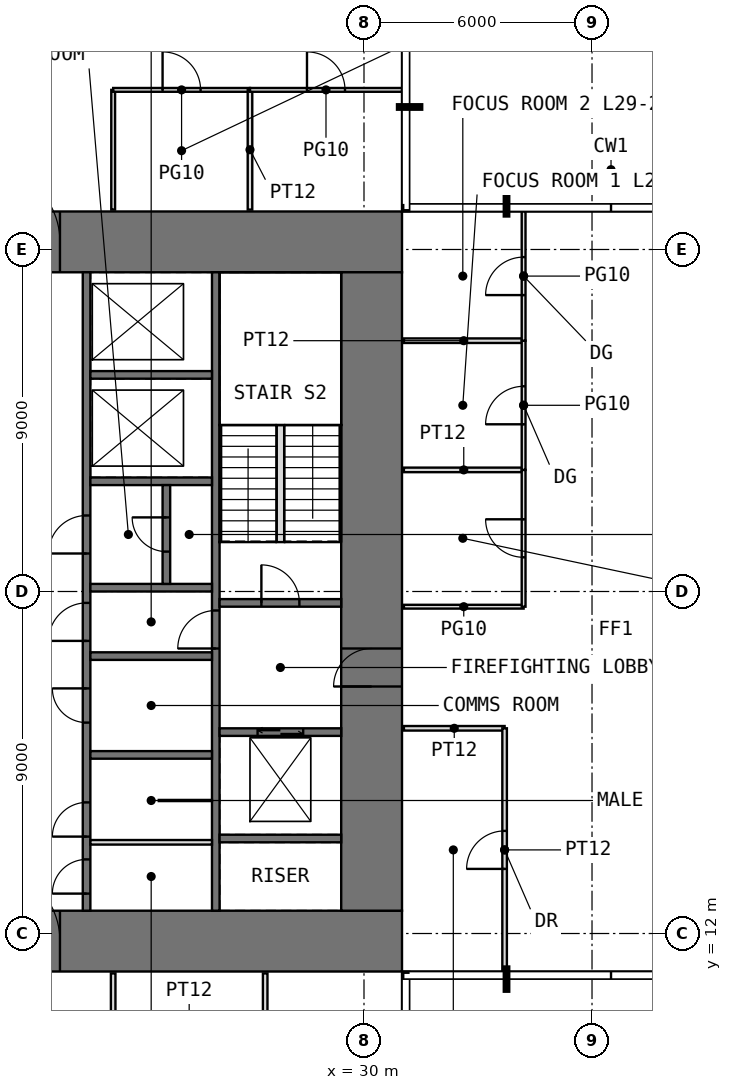
"""IFC4 building model, lengths in metres.
Left out: names, types, materials, properties, quantities, classifications, styles, units other than length and angle.
Written with IfcOpenShell. Run it as: python <this file> out.ifc"""

import sys

from ifc_helpers import new_model, si_unit, direction, frame, frame_2d, origin, place, context, subcontext, project, spatial, rectangle, extrude, element, fill, save


model = new_model("IFC4")
c1 = context("Model", 3, precision=1e-05, world=origin(), true_north=direction((0.0, 1.0)))
c2 = subcontext(c1, "Body", "Model", "MODEL_VIEW")
j1 = project(units=[si_unit("LENGTHUNIT", "METRE"), si_unit("PLANEANGLEUNIT", "RADIAN")], contexts=[c1])
p1 = place(None, origin())
s1 = spatial("IfcSite", under=j1, at=p1, CompositionType="ELEMENT")
p2 = place(p1, origin())
s2 = spatial("IfcBuilding", under=s1, at=p2, CompositionType="ELEMENT")
p3 = place(p2, frame((0.0, 0.0, 124.5)))
s3 = spatial("IfcBuildingStorey", under=s2, at=p3, CompositionType="ELEMENT", Elevation=124.5)
p4 = place(p3, frame((11.0, 11.8, -0.05), z_axis=(0.0, 0.0, 1.0), x_axis=(1.0, 0.0, 0.0)))
e1 = element("IfcWall", 1, at=p4, inside=s3, PredefinedType="SHEAR", context=c2, shape_type="SweptSolid", body=[
    extrude(rectangle(XDim=20.0, YDim=1.6, at=frame_2d((10.0, 0.0))), origin(), (0.0, 0.0, 1.0), 4.0),
])
p5 = place(p4, frame((9.0, 0.0, 0.05)))
e2 = element("IfcOpeningElement", 2, at=p5, cuts=e1, PredefinedType="OPENING", context=c2, shape_type="SweptSolid", body=[
    extrude(rectangle(XDim=2.0, YDim=2.2, at=frame_2d((1.0, 1.1))), frame((0.0, 0.81, 0.0), z_axis=(0.0, -1.0, 0.0), x_axis=(1.0, 0.0, 0.0)), (0.0, 0.0, 1.0), 1.62),
])
p6 = place(p3, frame((11.0, 30.2, -0.05), z_axis=(0.0, 0.0, 1.0), x_axis=(1.0, 0.0, 0.0)))
e3 = element("IfcWall", 3, at=p6, inside=s3, PredefinedType="SHEAR", context=c2, shape_type="SweptSolid", body=[
    extrude(rectangle(XDim=20.0, YDim=1.6, at=frame_2d((10.0, 0.0))), origin(), (0.0, 0.0, 1.0), 4.0),
])
p7 = place(p6, frame((9.0, 0.0, 0.05)))
e4 = element("IfcOpeningElement", 4, at=p7, cuts=e3, PredefinedType="OPENING", context=c2, shape_type="SweptSolid", body=[
    extrude(rectangle(XDim=2.0, YDim=2.2, at=frame_2d((1.0, 1.1))), frame((0.0, 0.81, 0.0), z_axis=(0.0, -1.0, 0.0), x_axis=(1.0, 0.0, 0.0)), (0.0, 0.0, 1.0), 1.62),
])
p8 = place(p3, frame((30.2, 12.6, -0.05), z_axis=(0.0, 0.0, 1.0), x_axis=(0.0, 1.0, 0.0)))
e5 = element("IfcWall", 5, at=p8, inside=s3, PredefinedType="SHEAR", context=c2, shape_type="SweptSolid", body=[
    extrude(rectangle(XDim=16.8, YDim=1.6, at=frame_2d((8.4, 0.0))), origin(), (0.0, 0.0, 1.0), 4.0),
])
p9 = place(p8, frame((5.9, 0.0, 0.05)))
e6 = element("IfcOpeningElement", 6, at=p9, cuts=e5, PredefinedType="OPENING", context=c2, shape_type="SweptSolid", body=[
    extrude(rectangle(XDim=1.0, YDim=2.2, at=frame_2d((0.5, 1.1))), frame((0.0, 0.81, 0.0), z_axis=(0.0, -1.0, 0.0), x_axis=(1.0, 0.0, 0.0)), (0.0, 0.0, 1.0), 1.62),
])
p10 = place(p3, frame((22.7, 12.6, -0.05), z_axis=(0.0, 0.0, 1.0), x_axis=(0.0, 1.0, 0.0)))
e7 = element("IfcWall", 7, at=p10, inside=s3, PredefinedType="SHEAR", context=c2, shape_type="SweptSolid", body=[
    extrude(rectangle(XDim=16.8, YDim=0.2, at=frame_2d((8.4, 0.0))), origin(), (0.0, 0.0, 1.0), 4.0),
])
p11 = place(p10, frame((0.45, 0.0, 0.05)))
e8 = element("IfcOpeningElement", 8, at=p11, cuts=e7, PredefinedType="OPENING", context=c2, shape_type="SweptSolid", body=[
    extrude(rectangle(XDim=0.9, YDim=2.2, at=frame_2d((0.45, 1.1))), frame((0.0, 0.11, 0.0), z_axis=(0.0, -1.0, 0.0), x_axis=(1.0, 0.0, 0.0)), (0.0, 0.0, 1.0), 0.22),
])
p12 = place(p10, frame((7.1, 0.0, 0.05)))
e9 = element("IfcOpeningElement", 9, at=p12, cuts=e7, PredefinedType="OPENING", context=c2, shape_type="SweptSolid", body=[
    extrude(rectangle(XDim=1.0, YDim=2.2, at=frame_2d((0.5, 1.1))), frame((0.0, 0.11, 0.0), z_axis=(0.0, -1.0, 0.0), x_axis=(1.0, 0.0, 0.0)), (0.0, 0.0, 1.0), 0.22),
])
p13 = place(p10, frame((1.95, 0.0, 0.05)))
e10 = element("IfcOpeningElement", 10, at=p13, cuts=e7, PredefinedType="OPENING", context=c2, shape_type="SweptSolid", body=[
    extrude(rectangle(XDim=0.9, YDim=2.2, at=frame_2d((0.45, 1.1))), frame((0.0, 0.11, 0.0), z_axis=(0.0, -1.0, 0.0), x_axis=(1.0, 0.0, 0.0)), (0.0, 0.0, 1.0), 0.22),
])
p14 = place(p10, frame((4.95, 0.0, 0.05)))
e11 = element("IfcOpeningElement", 11, at=p14, cuts=e7, PredefinedType="OPENING", context=c2, shape_type="SweptSolid", body=[
    extrude(rectangle(XDim=0.9, YDim=2.2, at=frame_2d((0.45, 1.1))), frame((0.0, 0.11, 0.0), z_axis=(0.0, -1.0, 0.0), x_axis=(1.0, 0.0, 0.0)), (0.0, 0.0, 1.0), 0.22),
])
p15 = place(p10, frame((9.4, 0.0, 0.05)))
e12 = element("IfcOpeningElement", 12, at=p15, cuts=e7, PredefinedType="OPENING", context=c2, shape_type="SweptSolid", body=[
    extrude(rectangle(XDim=1.0, YDim=2.2, at=frame_2d((0.5, 1.1))), frame((0.0, 0.11, 0.0), z_axis=(0.0, -1.0, 0.0), x_axis=(1.0, 0.0, 0.0)), (0.0, 0.0, 1.0), 0.22),
])
p16 = place(p3, frame((26.1, 12.6, -0.05), z_axis=(0.0, 0.0, 1.0), x_axis=(0.0, 1.0, 0.0)))
e13 = element("IfcWall", 13, at=p16, inside=s3, PredefinedType="SHEAR", context=c2, shape_type="SweptSolid", body=[
    extrude(rectangle(XDim=16.8, YDim=0.2, at=frame_2d((8.4, 0.0))), origin(), (0.0, 0.0, 1.0), 4.0),
])
p17 = place(p16, frame((6.9, 0.0, 0.05)))
e14 = element("IfcOpeningElement", 14, at=p17, cuts=e13, PredefinedType="OPENING", context=c2, shape_type="SweptSolid", body=[
    extrude(rectangle(XDim=1.0, YDim=2.2, at=frame_2d((0.5, 1.1))), frame((0.0, 0.11, 0.0), z_axis=(0.0, -1.0, 0.0), x_axis=(1.0, 0.0, 0.0)), (0.0, 0.0, 1.0), 0.22),
])
for number, where, z_axis, x_axis in (
    (15, (22.8, 16.7, -0.05), (0.0, 0.0, 1.0), (1.0, 0.0, 0.0)),
    (16, (22.8, 19.3, -0.05), (0.0, 0.0, 1.0), (1.0, 0.0, 0.0)),
    (17, (22.8, 21.1, -0.05), (0.0, 0.0, 1.0), (1.0, 0.0, 0.0)),
    (18, (22.8, 23.9, -0.05), (0.0, 0.0, 1.0), (1.0, 0.0, 0.0)),
    (19, (22.8, 26.7, -0.05), (0.0, 0.0, 1.0), (1.0, 0.0, 0.0)),
    (20, (26.2, 14.5, -0.05), (0.0, 0.0, 1.0), (1.0, 0.0, 0.0)),
):
    element("IfcWall", number, at=place(p3, frame(where, z_axis=z_axis, x_axis=x_axis)), inside=s3, PredefinedType="SHEAR", context=c2, shape_type="SweptSolid", body=[
        extrude(rectangle(XDim=3.2, YDim=0.2, at=frame_2d((1.6, 0.0))), origin(), (0.0, 0.0, 1.0), 4.0),
    ])
p18 = place(p3, frame((26.2, 17.3, -0.05), z_axis=(0.0, 0.0, 1.0), x_axis=(1.0, 0.0, 0.0)))
e21 = element("IfcWall", 21, at=p18, inside=s3, PredefinedType="SHEAR", context=c2, shape_type="SweptSolid", body=[
    extrude(rectangle(XDim=3.2, YDim=0.2, at=frame_2d((1.6, 0.0))), origin(), (0.0, 0.0, 1.0), 4.0),
])
p19 = place(p18, frame((1.0, 0.0, 0.05)))
e22 = element("IfcOpeningElement", 22, at=p19, cuts=e21, PredefinedType="OPENING", context=c2, shape_type="SweptSolid", body=[
    extrude(rectangle(XDim=1.2, YDim=2.2, at=frame_2d((0.6, 1.1))), frame((0.0, 0.11, 0.0), z_axis=(0.0, -1.0, 0.0), x_axis=(1.0, 0.0, 0.0)), (0.0, 0.0, 1.0), 0.22),
])
p20 = place(p3, frame((26.2, 20.7, -0.05), z_axis=(0.0, 0.0, 1.0), x_axis=(1.0, 0.0, 0.0)))
e23 = element("IfcWall", 23, at=p20, inside=s3, PredefinedType="SHEAR", context=c2, shape_type="SweptSolid", body=[
    extrude(rectangle(XDim=3.2, YDim=0.2, at=frame_2d((1.6, 0.0))), origin(), (0.0, 0.0, 1.0), 4.0),
])
p21 = place(p20, frame((1.1, 0.0, 0.05)))
e24 = element("IfcOpeningElement", 24, at=p21, cuts=e23, PredefinedType="OPENING", context=c2, shape_type="SweptSolid", body=[
    extrude(rectangle(XDim=1.0, YDim=2.2, at=frame_2d((0.5, 1.1))), frame((0.0, 0.11, 0.0), z_axis=(0.0, -1.0, 0.0), x_axis=(1.0, 0.0, 0.0)), (0.0, 0.0, 1.0), 0.22),
])
p22 = place(p3, frame((22.8, 14.4, 0.0), z_axis=(0.0, 0.0, 1.0), x_axis=(1.0, 0.0, 0.0)))
e25 = element("IfcWall", 25, at=p22, inside=s3, PredefinedType="PARTITIONING", context=c2, shape_type="SweptSolid", body=[
    extrude(rectangle(XDim=3.2, YDim=0.12, at=frame_2d((1.6, 0.0))), origin(), (0.0, 0.0, 1.0), 3.75),
])
p23 = place(p3, frame((24.6, 15.5, 0.0), z_axis=(0.0, 0.0, 1.0), x_axis=(1.0, 0.0, 0.0)))
e26 = element("IfcWall", 26, at=p23, inside=s3, PredefinedType="PARTITIONING", context=c2, shape_type="SweptSolid", body=[
    extrude(rectangle(XDim=1.4, YDim=0.03, at=frame_2d((0.7, 0.0))), origin(), (0.0, 0.0, 1.0), 3.75),
])
p24 = place(p3, frame((24.8, 21.2, -0.05), z_axis=(0.0, 0.0, 1.0), x_axis=(0.0, 1.0, 0.0)))
e27 = element("IfcWall", 27, at=p24, inside=s3, PredefinedType="SHEAR", context=c2, shape_type="SweptSolid", body=[
    extrude(rectangle(XDim=2.6, YDim=0.2, at=frame_2d((1.3, 0.0))), origin(), (0.0, 0.0, 1.0), 4.0),
])
p25 = place(p24, frame((0.85, 0.0, 0.05)))
e28 = element("IfcOpeningElement", 28, at=p25, cuts=e27, PredefinedType="OPENING", context=c2, shape_type="SweptSolid", body=[
    extrude(rectangle(XDim=0.9, YDim=2.2, at=frame_2d((0.45, 1.1))), frame((0.0, 0.11, 0.0), z_axis=(0.0, -1.0, 0.0), x_axis=(1.0, 0.0, 0.0)), (0.0, 0.0, 1.0), 0.22),
])
p26 = place(p3, frame((23.4, 8.3, 0.0), z_axis=(0.0, 0.0, 1.0), x_axis=(0.0, 1.0, 0.0)))
e29 = element("IfcWall", 29, at=p26, inside=s3, PredefinedType="PARTITIONING", context=c2, shape_type="SweptSolid", body=[
    extrude(rectangle(XDim=2.65, YDim=0.12, at=frame_2d((1.325, 0.0))), origin(), (0.0, 0.0, 1.0), 3.75),
])
p27 = place(p3, frame((23.4, 31.05, 0.0), z_axis=(0.0, 0.0, 1.0), x_axis=(0.0, 1.0, 0.0)))
e30 = element("IfcWall", 30, at=p27, inside=s3, PredefinedType="PARTITIONING", context=c2, shape_type="SweptSolid", body=[
    extrude(rectangle(XDim=3.15, YDim=0.1, at=frame_2d((1.575, 0.0))), origin(), (0.0, 0.0, 1.0), 3.75),
])
p28 = place(p3, frame((23.4, 34.2, 0.0), z_axis=(0.0, 0.0, 1.0), x_axis=(1.0, 0.0, 0.0)))
e31 = element("IfcWall", 31, at=p28, inside=s3, PredefinedType="PARTITIONING", context=c2, shape_type="SweptSolid", body=[
    extrude(rectangle(XDim=3.6, YDim=0.1, at=frame_2d((1.8, 0.0))), origin(), (0.0, 0.0, 1.0), 3.75),
])
p29 = place(p28, frame((1.3, 0.0, 0.0)))
e32 = element("IfcOpeningElement", 32, at=p29, cuts=e31, PredefinedType="OPENING", context=c2, shape_type="SweptSolid", body=[
    extrude(rectangle(XDim=1.0, YDim=2.4, at=frame_2d((0.5, 1.2))), frame((0.0, 0.06, 0.0), z_axis=(0.0, -1.0, 0.0), x_axis=(1.0, 0.0, 0.0)), (0.0, 0.0, 1.0), 0.12),
])
p30 = place(p3, frame((27.0, 31.05, 0.0), z_axis=(0.0, 0.0, 1.0), x_axis=(0.0, 1.0, 0.0)))
e33 = element("IfcWall", 33, at=p30, inside=s3, PredefinedType="PARTITIONING", context=c2, shape_type="SweptSolid", body=[
    extrude(rectangle(XDim=3.15, YDim=0.12, at=frame_2d((1.575, 0.0))), origin(), (0.0, 0.0, 1.0), 3.75),
])
p31 = place(p3, frame((27.0, 34.2, 0.0), z_axis=(0.0, 0.0, 1.0), x_axis=(1.0, 0.0, 0.0)))
e34 = element("IfcWall", 34, at=p31, inside=s3, PredefinedType="PARTITIONING", context=c2, shape_type="SweptSolid", body=[
    extrude(rectangle(XDim=4.0, YDim=0.1, at=frame_2d((2.0, 0.0))), origin(), (0.0, 0.0, 1.0), 3.75),
])
p32 = place(p31, frame((1.5, 0.0, 0.0)))
e35 = element("IfcOpeningElement", 35, at=p32, cuts=e34, PredefinedType="OPENING", context=c2, shape_type="SweptSolid", body=[
    extrude(rectangle(XDim=1.0, YDim=2.4, at=frame_2d((0.5, 1.2))), frame((0.0, 0.06, 0.0), z_axis=(0.0, -1.0, 0.0), x_axis=(1.0, 0.0, 0.0)), (0.0, 0.0, 1.0), 0.12),
])
for number, where, z_axis, x_axis in (
    (36, (27.4, 8.3, 0.0), (0.0, 0.0, 1.0), (0.0, 1.0, 0.0)),
    (37, (31.05, 17.4, 0.0), (0.0, 0.0, 1.0), (1.0, 0.0, 0.0)),
):
    element("IfcWall", number, at=place(p3, frame(where, z_axis=z_axis, x_axis=x_axis)), inside=s3, PredefinedType="PARTITIONING", context=c2, shape_type="SweptSolid", body=[
        extrude(rectangle(XDim=2.65, YDim=0.12, at=frame_2d((1.325, 0.0))), origin(), (0.0, 0.0, 1.0), 3.75),
    ])
p33 = place(p3, frame((31.05, 20.6, 0.0), z_axis=(0.0, 0.0, 1.0), x_axis=(1.0, 0.0, 0.0)))
e38 = element("IfcWall", 38, at=p33, inside=s3, PredefinedType="PARTITIONING", context=c2, shape_type="SweptSolid", body=[
    extrude(rectangle(XDim=3.15, YDim=0.1, at=frame_2d((1.575, 0.0))), origin(), (0.0, 0.0, 1.0), 3.75),
])
for number, where, z_axis, x_axis in (
    (39, (31.05, 24.2, 0.0), (0.0, 0.0, 1.0), (1.0, 0.0, 0.0)),
    (40, (31.05, 27.6, 0.0), (0.0, 0.0, 1.0), (1.0, 0.0, 0.0)),
):
    element("IfcWall", number, at=place(p3, frame(where, z_axis=z_axis, x_axis=x_axis)), inside=s3, PredefinedType="PARTITIONING", context=c2, shape_type="SweptSolid", body=[
        extrude(rectangle(XDim=3.15, YDim=0.12, at=frame_2d((1.575, 0.0))), origin(), (0.0, 0.0, 1.0), 3.75),
    ])
p34 = place(p3, frame((33.7, 11.0, 0.0), z_axis=(0.0, 0.0, 1.0), x_axis=(0.0, 1.0, 0.0)))
e41 = element("IfcWall", 41, at=p34, inside=s3, PredefinedType="PARTITIONING", context=c2, shape_type="SweptSolid", body=[
    extrude(rectangle(XDim=6.4, YDim=0.12, at=frame_2d((3.2, 0.0))), origin(), (0.0, 0.0, 1.0), 3.75),
])
p35 = place(p34, frame((2.7, 0.0, 0.0)))
e42 = element("IfcOpeningElement", 42, at=p35, cuts=e41, PredefinedType="OPENING", context=c2, shape_type="SweptSolid", body=[
    extrude(rectangle(XDim=1.0, YDim=2.2, at=frame_2d((0.5, 1.1))), frame((0.0, 0.07, 0.0), z_axis=(0.0, -1.0, 0.0), x_axis=(1.0, 0.0, 0.0)), (0.0, 0.0, 1.0), 0.14),
])
p36 = place(p3, frame((34.2, 20.6, 0.0), z_axis=(0.0, 0.0, 1.0), x_axis=(0.0, 1.0, 0.0)))
e43 = element("IfcWall", 43, at=p36, inside=s3, PredefinedType="PARTITIONING", context=c2, shape_type="SweptSolid", body=[
    extrude(rectangle(XDim=3.6, YDim=0.1, at=frame_2d((1.8, 0.0))), origin(), (0.0, 0.0, 1.0), 3.75),
])
p37 = place(p36, frame((1.3, 0.0, 0.0)))
e44 = element("IfcOpeningElement", 44, at=p37, cuts=e43, PredefinedType="OPENING", context=c2, shape_type="SweptSolid", body=[
    extrude(rectangle(XDim=1.0, YDim=2.4, at=frame_2d((0.5, 1.2))), frame((0.0, 0.06, 0.0), z_axis=(0.0, -1.0, 0.0), x_axis=(1.0, 0.0, 0.0)), (0.0, 0.0, 1.0), 0.12),
])
p38 = place(p3, frame((34.2, 24.2, 0.0), z_axis=(0.0, 0.0, 1.0), x_axis=(0.0, 1.0, 0.0)))
e45 = element("IfcWall", 45, at=p38, inside=s3, PredefinedType="PARTITIONING", context=c2, shape_type="SweptSolid", body=[
    extrude(rectangle(XDim=3.4, YDim=0.1, at=frame_2d((1.7, 0.0))), origin(), (0.0, 0.0, 1.0), 3.75),
])
p39 = place(p38, frame((1.2, 0.0, 0.0)))
e46 = element("IfcOpeningElement", 46, at=p39, cuts=e45, PredefinedType="OPENING", context=c2, shape_type="SweptSolid", body=[
    extrude(rectangle(XDim=1.0, YDim=2.4, at=frame_2d((0.5, 1.2))), frame((0.0, 0.06, 0.0), z_axis=(0.0, -1.0, 0.0), x_axis=(1.0, 0.0, 0.0)), (0.0, 0.0, 1.0), 0.12),
])
p40 = place(p3, frame((34.2, 27.6, 0.0), z_axis=(0.0, 0.0, 1.0), x_axis=(0.0, 1.0, 0.0)))
e47 = element("IfcWall", 47, at=p40, inside=s3, PredefinedType="PARTITIONING", context=c2, shape_type="SweptSolid", body=[
    extrude(rectangle(XDim=3.4, YDim=0.1, at=frame_2d((1.7, 0.0))), origin(), (0.0, 0.0, 1.0), 3.75),
])
p41 = place(p40, frame((1.2, 0.0, 0.0)))
e48 = element("IfcOpeningElement", 48, at=p41, cuts=e47, PredefinedType="OPENING", context=c2, shape_type="SweptSolid", body=[
    extrude(rectangle(XDim=1.0, YDim=2.4, at=frame_2d((0.5, 1.2))), frame((0.0, 0.06, 0.0), z_axis=(0.0, -1.0, 0.0), x_axis=(1.0, 0.0, 0.0)), (0.0, 0.0, 1.0), 0.12),
])
p42 = place(p3, frame((27.8, 22.3, 0.0), z_axis=(0.0, 0.0, 1.0), x_axis=(0.0, 1.0, 0.0)))
e49 = element("IfcWall", 49, at=p42, inside=s3, PredefinedType="PARTITIONING", context=c2, shape_type="SweptSolid", body=[
    extrude(rectangle(XDim=3.08, YDim=0.2, at=frame_2d((1.54, 0.0))), origin(), (0.0, 0.0, 1.0), 4.0),
])
p43 = place(p5, origin())
e50 = element("IfcDoor", 50, at=p43, inside=s3, OperationType="DOUBLE_DOOR_SINGLE_SWING", PredefinedType="DOOR", context=c2, shape_type="SweptSolid", body=[
    extrude(rectangle(XDim=2.0, YDim=2.2, at=frame_2d((1.0, 1.1))), frame((0.0, 0.025, 0.0), z_axis=(0.0, -1.0, 0.0), x_axis=(1.0, 0.0, 0.0)), (0.0, 0.0, 1.0), 0.05),
])
fill(e2, e50)
p44 = place(p7, origin())
e51 = element("IfcDoor", 51, at=p44, inside=s3, OperationType="DOUBLE_DOOR_SINGLE_SWING", PredefinedType="DOOR", context=c2, shape_type="SweptSolid", body=[
    extrude(rectangle(XDim=2.0, YDim=2.2, at=frame_2d((1.0, 1.1))), frame((0.0, 0.025, 0.0), z_axis=(0.0, -1.0, 0.0), x_axis=(1.0, 0.0, 0.0)), (0.0, 0.0, 1.0), 0.05),
])
fill(e4, e51)
p45 = place(p11, origin())
e52 = element("IfcDoor", 52, at=p45, inside=s3, OperationType="SINGLE_SWING_LEFT", PredefinedType="DOOR", context=c2, shape_type="SweptSolid", body=[
    extrude(rectangle(XDim=0.9, YDim=2.2, at=frame_2d((0.45, 1.1))), frame((0.0, 0.025, 0.0), z_axis=(0.0, -1.0, 0.0), x_axis=(1.0, 0.0, 0.0)), (0.0, 0.0, 1.0), 0.05),
])
fill(e8, e52)
p46 = place(p9, origin())
e53 = element("IfcDoor", 53, at=p46, inside=s3, OperationType="SINGLE_SWING_LEFT", PredefinedType="DOOR", context=c2, shape_type="SweptSolid", body=[
    extrude(rectangle(XDim=1.0, YDim=2.2, at=frame_2d((0.5, 1.1))), frame((0.0, 0.025, 0.0), z_axis=(0.0, -1.0, 0.0), x_axis=(1.0, 0.0, 0.0)), (0.0, 0.0, 1.0), 0.05),
])
fill(e6, e53)
p47 = place(p21, origin())
e54 = element("IfcDoor", 54, at=p47, inside=s3, OperationType="SINGLE_SWING_LEFT", PredefinedType="DOOR", context=c2, shape_type="SweptSolid", body=[
    extrude(rectangle(XDim=1.0, YDim=2.2, at=frame_2d((0.5, 1.1))), frame((0.0, 0.025, 0.0), z_axis=(0.0, -1.0, 0.0), x_axis=(1.0, 0.0, 0.0)), (0.0, 0.0, 1.0), 0.05),
])
fill(e24, e54)
p48 = place(p17, origin())
e55 = element("IfcDoor", 55, at=p48, inside=s3, OperationType="SINGLE_SWING_LEFT", PredefinedType="DOOR", context=c2, shape_type="SweptSolid", body=[
    extrude(rectangle(XDim=1.0, YDim=2.2, at=frame_2d((0.5, 1.1))), frame((0.0, 0.025, 0.0), z_axis=(0.0, -1.0, 0.0), x_axis=(1.0, 0.0, 0.0)), (0.0, 0.0, 1.0), 0.05),
])
fill(e14, e55)
p49 = place(p12, origin())
e56 = element("IfcDoor", 56, at=p49, inside=s3, OperationType="SINGLE_SWING_LEFT", PredefinedType="DOOR", context=c2, shape_type="SweptSolid", body=[
    extrude(rectangle(XDim=1.0, YDim=2.2, at=frame_2d((0.5, 1.1))), frame((0.0, 0.025, 0.0), z_axis=(0.0, -1.0, 0.0), x_axis=(1.0, 0.0, 0.0)), (0.0, 0.0, 1.0), 0.05),
])
fill(e9, e56)
p50 = place(p13, origin())
e57 = element("IfcDoor", 57, at=p50, inside=s3, OperationType="SINGLE_SWING_LEFT", PredefinedType="DOOR", context=c2, shape_type="SweptSolid", body=[
    extrude(rectangle(XDim=0.9, YDim=2.2, at=frame_2d((0.45, 1.1))), frame((0.0, 0.025, 0.0), z_axis=(0.0, -1.0, 0.0), x_axis=(1.0, 0.0, 0.0)), (0.0, 0.0, 1.0), 0.05),
])
fill(e10, e57)
p51 = place(p14, origin())
e58 = element("IfcDoor", 58, at=p51, inside=s3, OperationType="SINGLE_SWING_RIGHT", PredefinedType="DOOR", context=c2, shape_type="SweptSolid", body=[
    extrude(rectangle(XDim=0.9, YDim=2.2, at=frame_2d((0.45, 1.1))), frame((0.0, 0.025, 0.0), z_axis=(0.0, -1.0, 0.0), x_axis=(1.0, 0.0, 0.0)), (0.0, 0.0, 1.0), 0.05),
])
fill(e11, e58)
p52 = place(p15, origin())
e59 = element("IfcDoor", 59, at=p52, inside=s3, OperationType="SINGLE_SWING_LEFT", PredefinedType="DOOR", context=c2, shape_type="SweptSolid", body=[
    extrude(rectangle(XDim=1.0, YDim=2.2, at=frame_2d((0.5, 1.1))), frame((0.0, 0.025, 0.0), z_axis=(0.0, -1.0, 0.0), x_axis=(1.0, 0.0, 0.0)), (0.0, 0.0, 1.0), 0.05),
])
fill(e12, e59)
p53 = place(p25, origin())
e60 = element("IfcDoor", 60, at=p53, inside=s3, OperationType="SINGLE_SWING_RIGHT", PredefinedType="DOOR", context=c2, shape_type="SweptSolid", body=[
    extrude(rectangle(XDim=0.9, YDim=2.2, at=frame_2d((0.45, 1.1))), frame((0.0, 0.025, 0.0), z_axis=(0.0, -1.0, 0.0), x_axis=(1.0, 0.0, 0.0)), (0.0, 0.0, 1.0), 0.05),
])
fill(e28, e60)
p54 = place(p35, origin())
e61 = element("IfcDoor", 61, at=p54, inside=s3, OperationType="SINGLE_SWING_LEFT", PredefinedType="DOOR", context=c2, shape_type="SweptSolid", body=[
    extrude(rectangle(XDim=1.0, YDim=2.2, at=frame_2d((0.5, 1.1))), frame((0.0, 0.025, 0.0), z_axis=(0.0, -1.0, 0.0), x_axis=(1.0, 0.0, 0.0)), (0.0, 0.0, 1.0), 0.05),
])
fill(e42, e61)
p55 = place(p37, origin())
e62 = element("IfcDoor", 62, at=p55, inside=s3, OperationType="SINGLE_SWING_RIGHT", PredefinedType="DOOR", context=c2, shape_type="SweptSolid", body=[
    extrude(rectangle(XDim=1.0, YDim=2.4, at=frame_2d((0.5, 1.2))), frame((0.0, 0.025, 0.0), z_axis=(0.0, -1.0, 0.0), x_axis=(1.0, 0.0, 0.0)), (0.0, 0.0, 1.0), 0.05),
])
fill(e44, e62)
p56 = place(p39, origin())
e63 = element("IfcDoor", 63, at=p56, inside=s3, OperationType="SINGLE_SWING_LEFT", PredefinedType="DOOR", context=c2, shape_type="SweptSolid", body=[
    extrude(rectangle(XDim=1.0, YDim=2.4, at=frame_2d((0.5, 1.2))), frame((0.0, 0.025, 0.0), z_axis=(0.0, -1.0, 0.0), x_axis=(1.0, 0.0, 0.0)), (0.0, 0.0, 1.0), 0.05),
])
fill(e46, e63)
p57 = place(p41, origin())
e64 = element("IfcDoor", 64, at=p57, inside=s3, OperationType="SINGLE_SWING_LEFT", PredefinedType="DOOR", context=c2, shape_type="SweptSolid", body=[
    extrude(rectangle(XDim=1.0, YDim=2.4, at=frame_2d((0.5, 1.2))), frame((0.0, 0.025, 0.0), z_axis=(0.0, -1.0, 0.0), x_axis=(1.0, 0.0, 0.0)), (0.0, 0.0, 1.0), 0.05),
])
fill(e48, e64)
p58 = place(p29, origin())
e65 = element("IfcDoor", 65, at=p58, inside=s3, OperationType="SINGLE_SWING_LEFT", PredefinedType="DOOR", context=c2, shape_type="SweptSolid", body=[
    extrude(rectangle(XDim=1.0, YDim=2.4, at=frame_2d((0.5, 1.2))), frame((0.0, 0.025, 0.0), z_axis=(0.0, -1.0, 0.0), x_axis=(1.0, 0.0, 0.0)), (0.0, 0.0, 1.0), 0.05),
])
fill(e32, e65)
p59 = place(p32, origin())
e66 = element("IfcDoor", 66, at=p59, inside=s3, OperationType="SINGLE_SWING_LEFT", PredefinedType="DOOR", context=c2, shape_type="SweptSolid", body=[
    extrude(rectangle(XDim=1.0, YDim=2.4, at=frame_2d((0.5, 1.2))), frame((0.0, 0.025, 0.0), z_axis=(0.0, -1.0, 0.0), x_axis=(1.0, 0.0, 0.0)), (0.0, 0.0, 1.0), 0.05),
])
fill(e35, e66)
p60 = place(p19, origin())
e67 = element("IfcDoor", 67, at=p60, inside=s3, OperationType="DOUBLE_DOOR_SLIDING", PredefinedType="DOOR", context=c2, shape_type="SweptSolid", body=[
    extrude(rectangle(XDim=1.2, YDim=2.2, at=frame_2d((0.6, 1.1))), frame((0.0, 0.025, 0.0), z_axis=(0.0, -1.0, 0.0), x_axis=(1.0, 0.0, 0.0)), (0.0, 0.0, 1.0), 0.05),
])
fill(e22, e67)
save(model, sys.argv[1])
